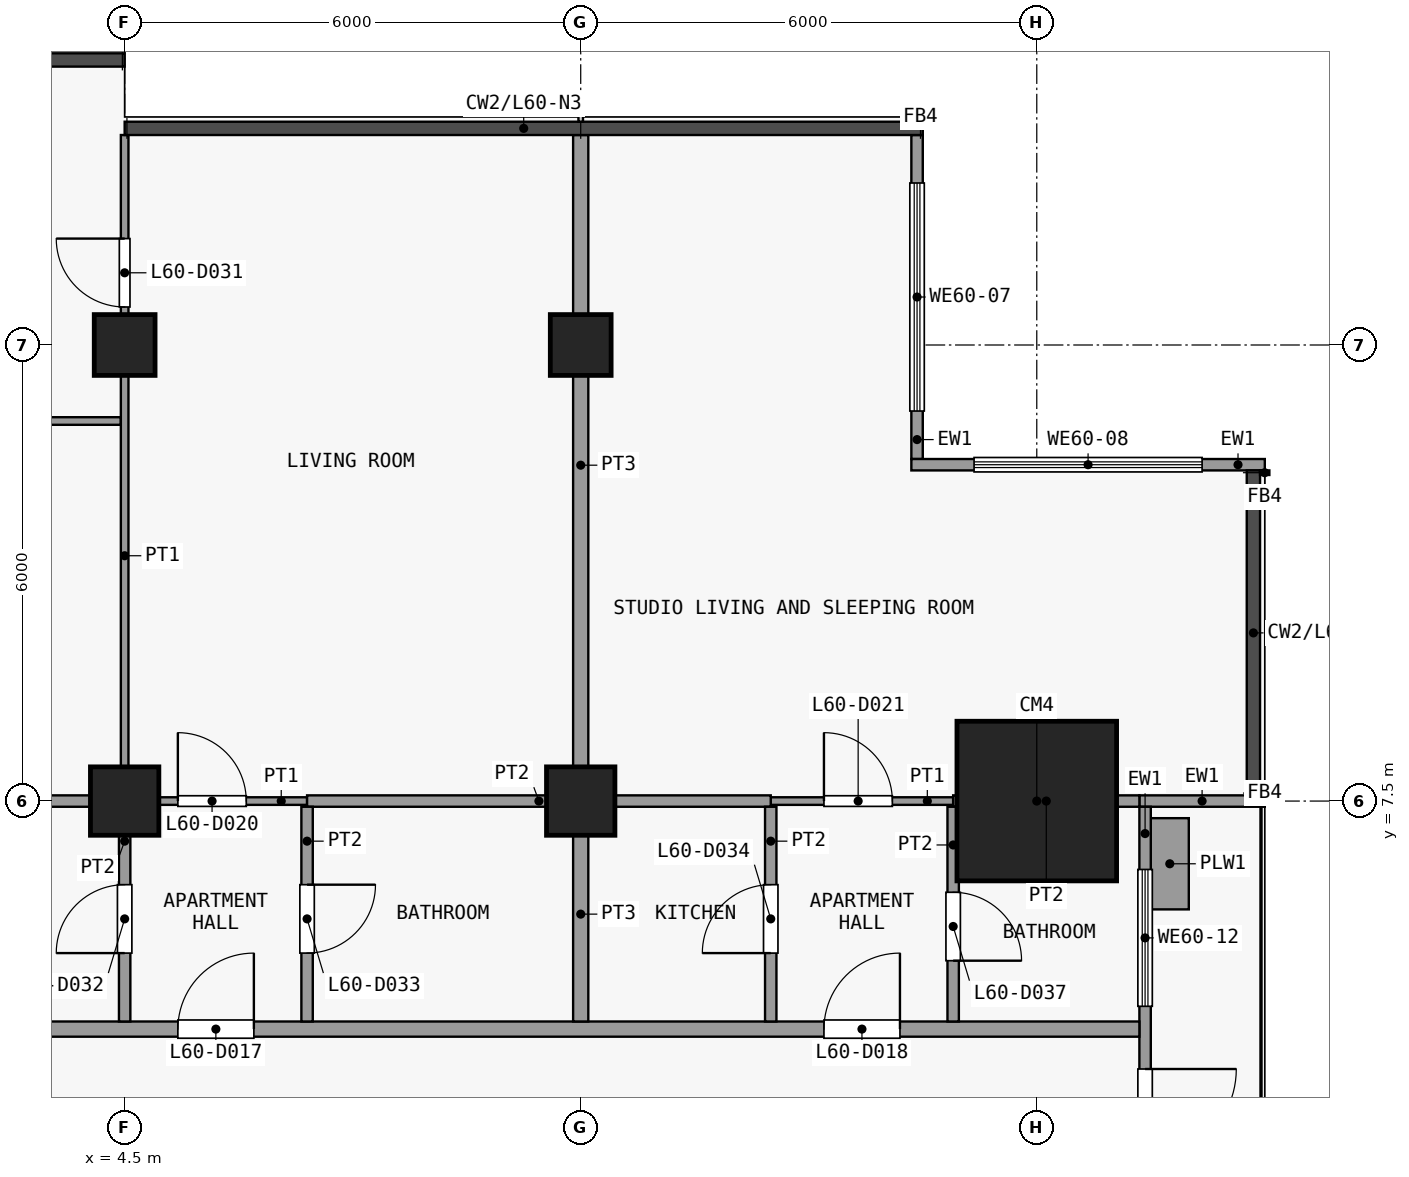
"""IFC4 building model, lengths in metres.
Left out: names, types, materials, properties, quantities, classifications, styles, units other than length and angle.
Written with IfcOpenShell. Run it as: python <this file> out.ifc"""

import sys

from ifc_helpers import new_model, si_unit, direction, frame, frame_2d, origin, origin_2d, place, context, subcontext, project, spatial, rectangle, extrude, element, fill, save


model = new_model("IFC4")
c1 = context("Model", 3, precision=1e-05, world=origin(), true_north=direction((0.0, 1.0)))
c2 = subcontext(c1, "Body", "Model", "MODEL_VIEW")
j1 = project(units=[si_unit("LENGTHUNIT", "METRE"), si_unit("PLANEANGLEUNIT", "RADIAN")], contexts=[c1])
p1 = place(None, origin())
s1 = spatial("IfcSite", under=j1, at=p1, CompositionType="ELEMENT")
p2 = place(p1, origin())
s2 = spatial("IfcBuilding", under=s1, at=p2, CompositionType="ELEMENT")
p3 = place(p2, frame((0.0, 0.0, 237.5)))
s3 = spatial("IfcBuildingStorey", under=s2, at=p3, CompositionType="ELEMENT", Elevation=237.5)
p4 = place(p3, frame((4.5, 7.5, 0.0), z_axis=(0.0, 0.0, 1.0), x_axis=(1.0, 0.0, 0.0)))
e1 = element("IfcColumn", 1, at=p4, inside=s3, PredefinedType="COLUMN", context=c2, shape_type="SweptSolid", body=[
    extrude(rectangle(XDim=0.9, YDim=0.9, at=origin_2d()), origin(), (0.0, 0.0, 1.0), 3.6),
])
p5 = place(p3, frame((4.5, 13.5, 0.0), z_axis=(0.0, 0.0, 1.0), x_axis=(1.0, 0.0, 0.0)))
e2 = element("IfcColumn", 2, at=p5, inside=s3, PredefinedType="COLUMN", context=c2, shape_type="SweptSolid", body=[
    extrude(rectangle(XDim=0.8, YDim=0.8, at=origin_2d()), origin(), (0.0, 0.0, 1.0), 3.6),
])
p6 = place(p3, frame((10.5, 7.5, 0.0), z_axis=(0.0, 0.0, 1.0), x_axis=(1.0, 0.0, 0.0)))
e3 = element("IfcColumn", 3, at=p6, inside=s3, PredefinedType="COLUMN", context=c2, shape_type="SweptSolid", body=[
    extrude(rectangle(XDim=0.9, YDim=0.9, at=origin_2d()), origin(), (0.0, 0.0, 1.0), 3.6),
])
p7 = place(p3, frame((10.5, 13.5, 0.0), z_axis=(0.0, 0.0, 1.0), x_axis=(1.0, 0.0, 0.0)))
e4 = element("IfcColumn", 4, at=p7, inside=s3, PredefinedType="COLUMN", context=c2, shape_type="SweptSolid", body=[
    extrude(rectangle(XDim=0.8, YDim=0.8, at=origin_2d()), origin(), (0.0, 0.0, 1.0), 3.6),
])
p8 = place(p3, frame((16.5, 7.5, 0.0), z_axis=(0.0, 0.0, 1.0), x_axis=(1.0, 0.0, 0.0)))
e5 = element("IfcColumn", 5, at=p8, inside=s3, PredefinedType="COLUMN", context=c2, shape_type="SweptSolid", body=[
    extrude(rectangle(XDim=2.1, YDim=2.1, at=origin_2d()), origin(), (0.0, 0.0, 1.0), 3.6),
])
p9 = place(p3, frame((14.925, 16.262, 0.0), z_axis=(0.0, 0.0, 1.0), x_axis=(0.0, -1.0, 0.0)))
e6 = element("IfcWall", 6, at=p9, inside=s3, PredefinedType="SOLIDWALL", context=c2, shape_type="SweptSolid", body=[
    extrude(rectangle(XDim=4.262, YDim=0.15, at=frame_2d((2.131, 0.0))), origin(), (0.0, 0.0, 1.0), 3.3),
])
p10 = place(p9, frame((0.631, 0.0, 0.9)))
e7 = element("IfcOpeningElement", 7, at=p10, cuts=e6, PredefinedType="OPENING", context=c2, shape_type="SweptSolid", body=[
    extrude(rectangle(XDim=3.0, YDim=2.4, at=frame_2d((1.5, 1.2))), frame((0.0, 0.085, 0.0), z_axis=(0.0, -1.0, 0.0), x_axis=(1.0, 0.0, 0.0)), (0.0, 0.0, 1.0), 0.17),
])
p11 = place(p3, frame((14.85, 11.925, 0.0), z_axis=(0.0, 0.0, 1.0), x_axis=(1.0, 0.0, 0.0)))
e8 = element("IfcWall", 8, at=p11, inside=s3, PredefinedType="SOLIDWALL", context=c2, shape_type="SweptSolid", body=[
    extrude(rectangle(XDim=4.65, YDim=0.15, at=frame_2d((2.325, 0.0))), origin(), (0.0, 0.0, 1.0), 3.3),
])
p12 = place(p11, frame((0.825, 0.0, 0.9)))
e9 = element("IfcOpeningElement", 9, at=p12, cuts=e8, PredefinedType="OPENING", context=c2, shape_type="SweptSolid", body=[
    extrude(rectangle(XDim=3.0, YDim=2.4, at=frame_2d((1.5, 1.2))), frame((0.0, 0.085, 0.0), z_axis=(0.0, -1.0, 0.0), x_axis=(1.0, 0.0, 0.0)), (0.0, 0.0, 1.0), 0.17),
])
p13 = place(p3, frame((17.85, 7.5, 0.0), z_axis=(0.0, 0.0, 1.0), x_axis=(1.0, 0.0, 0.0)))
e10 = element("IfcWall", 10, at=p13, inside=s3, PredefinedType="SOLIDWALL", context=c2, shape_type="SweptSolid", body=[
    extrude(rectangle(XDim=1.65, YDim=0.15, at=frame_2d((0.825, 0.0))), origin(), (0.0, 0.0, 1.0), 3.3),
])
p14 = place(p3, frame((17.925, 7.425, 0.0), z_axis=(0.0, 0.0, 1.0), x_axis=(0.0, -1.0, 0.0)))
e11 = element("IfcWall", 11, at=p14, inside=s3, PredefinedType="SOLIDWALL", context=c2, shape_type="SweptSolid", body=[
    extrude(rectangle(XDim=5.85, YDim=0.15, at=frame_2d((2.925, 0.0))), origin(), (0.0, 0.0, 1.0), 3.3),
])
p15 = place(p14, frame((3.45, 0.0, 0.0)))
e12 = element("IfcOpeningElement", 12, at=p15, cuts=e11, PredefinedType="OPENING", context=c2, shape_type="SweptSolid", body=[
    extrude(rectangle(XDim=1.2, YDim=2.4, at=frame_2d((0.6, 1.2))), frame((0.0, 0.085, 0.0), z_axis=(0.0, -1.0, 0.0), x_axis=(1.0, 0.0, 0.0)), (0.0, 0.0, 1.0), 0.17),
])
p16 = place(p14, frame((4.9, 0.0, 0.9)))
e13 = element("IfcOpeningElement", 13, at=p16, cuts=e11, PredefinedType="OPENING", context=c2, shape_type="SweptSolid", body=[
    extrude(rectangle(XDim=0.7, YDim=2.1, at=frame_2d((0.35, 1.05))), frame((0.0, 0.085, 0.0), z_axis=(0.0, -1.0, 0.0), x_axis=(1.0, 0.0, 0.0)), (0.0, 0.0, 1.0), 0.17),
])
p17 = place(p14, frame((0.825, 0.0, 0.9)))
e14 = element("IfcOpeningElement", 14, at=p17, cuts=e11, PredefinedType="OPENING", context=c2, shape_type="SweptSolid", body=[
    extrude(rectangle(XDim=1.8, YDim=2.1, at=frame_2d((0.9, 1.05))), frame((0.0, 0.085, 0.0), z_axis=(0.0, -1.0, 0.0), x_axis=(1.0, 0.0, 0.0)), (0.0, 0.0, 1.0), 0.17),
])
p18 = place(p3, frame((18.25, 6.075, 0.0), z_axis=(0.0, 0.0, 1.0), x_axis=(0.0, 1.0, 0.0)))
e15 = element("IfcWall", 15, at=p18, inside=s3, PredefinedType="USERDEFINED", context=c2, shape_type="SweptSolid", body=[
    extrude(rectangle(XDim=1.2, YDim=0.5, at=frame_2d((0.6, 0.0))), origin(), (0.0, 0.0, 1.0), 0.9),
])
p19 = place(p3, frame((-19.35, 4.5, 0.0), z_axis=(0.0, 0.0, 1.0), x_axis=(1.0, 0.0, 0.0)))
e16 = element("IfcWall", 16, at=p19, inside=s3, PredefinedType="PARTITIONING", context=c2, shape_type="SweptSolid", body=[
    extrude(rectangle(XDim=37.2, YDim=0.2, at=frame_2d((18.6, 0.0))), origin(), (0.0, 0.0, 1.0), 3.3),
])
p20 = place(p19, frame((7.05, 0.0, 0.0)))
e17 = element("IfcOpeningElement", 17, at=p20, cuts=e16, PredefinedType="OPENING", context=c2, shape_type="SweptSolid", body=[
    extrude(rectangle(XDim=1.0, YDim=2.1, at=frame_2d((0.5, 1.05))), frame((0.0, 0.11, 0.0), z_axis=(0.0, -1.0, 0.0), x_axis=(1.0, 0.0, 0.0)), (0.0, 0.0, 1.0), 0.22),
])
p21 = place(p19, frame((24.55, 0.0, 0.0)))
e18 = element("IfcOpeningElement", 18, at=p21, cuts=e16, PredefinedType="OPENING", context=c2, shape_type="SweptSolid", body=[
    extrude(rectangle(XDim=1.0, YDim=2.1, at=frame_2d((0.5, 1.05))), frame((0.0, 0.11, 0.0), z_axis=(0.0, -1.0, 0.0), x_axis=(1.0, 0.0, 0.0)), (0.0, 0.0, 1.0), 0.22),
])
p22 = place(p19, frame((33.05, 0.0, 0.0)))
e19 = element("IfcOpeningElement", 19, at=p22, cuts=e16, PredefinedType="OPENING", context=c2, shape_type="SweptSolid", body=[
    extrude(rectangle(XDim=1.0, YDim=2.1, at=frame_2d((0.5, 1.05))), frame((0.0, 0.11, 0.0), z_axis=(0.0, -1.0, 0.0), x_axis=(1.0, 0.0, 0.0)), (0.0, 0.0, 1.0), 0.22),
])
p23 = place(p3, frame((4.5, 7.5, 0.0), z_axis=(0.0, 0.0, 1.0), x_axis=(1.0, 0.0, 0.0)))
e20 = element("IfcWall", 20, at=p23, inside=s3, PredefinedType="PARTITIONING", context=c2, shape_type="SweptSolid", body=[
    extrude(rectangle(XDim=2.4, YDim=0.1, at=frame_2d((1.2, 0.0))), origin(), (0.0, 0.0, 1.0), 3.3),
])
p24 = place(p23, frame((0.7, 0.0, 0.0)))
e21 = element("IfcOpeningElement", 21, at=p24, cuts=e20, PredefinedType="OPENING", context=c2, shape_type="SweptSolid", body=[
    extrude(rectangle(XDim=0.9, YDim=2.1, at=frame_2d((0.45, 1.05))), frame((0.0, 0.06, 0.0), z_axis=(0.0, -1.0, 0.0), x_axis=(1.0, 0.0, 0.0)), (0.0, 0.0, 1.0), 0.12),
])
p25 = place(p3, frame((13.0, 7.5, 0.0), z_axis=(0.0, 0.0, 1.0), x_axis=(1.0, 0.0, 0.0)))
e22 = element("IfcWall", 22, at=p25, inside=s3, PredefinedType="PARTITIONING", context=c2, shape_type="SweptSolid", body=[
    extrude(rectangle(XDim=2.4, YDim=0.1, at=frame_2d((1.2, 0.0))), origin(), (0.0, 0.0, 1.0), 3.3),
])
p26 = place(p25, frame((0.7, 0.0, 0.0)))
e23 = element("IfcOpeningElement", 23, at=p26, cuts=e22, PredefinedType="OPENING", context=c2, shape_type="SweptSolid", body=[
    extrude(rectangle(XDim=0.9, YDim=2.1, at=frame_2d((0.45, 1.05))), frame((0.0, 0.06, 0.0), z_axis=(0.0, -1.0, 0.0), x_axis=(1.0, 0.0, 0.0)), (0.0, 0.0, 1.0), 0.12),
])
p27 = place(p3, frame((-4.5, 7.5, 0.0), z_axis=(0.0, 0.0, 1.0), x_axis=(1.0, 0.0, 0.0)))
e24 = element("IfcWall", 24, at=p27, inside=s3, PredefinedType="PARTITIONING", context=c2, shape_type="SweptSolid", body=[
    extrude(rectangle(XDim=9.0, YDim=0.15, at=frame_2d((4.5, 0.0))), origin(), (0.0, 0.0, 1.0), 3.3),
])
p28 = place(p3, frame((6.9, 7.5, 0.0), z_axis=(0.0, 0.0, 1.0), x_axis=(1.0, 0.0, 0.0)))
e25 = element("IfcWall", 25, at=p28, inside=s3, PredefinedType="PARTITIONING", context=c2, shape_type="SweptSolid", body=[
    extrude(rectangle(XDim=6.1, YDim=0.15, at=frame_2d((3.05, 0.0))), origin(), (0.0, 0.0, 1.0), 3.3),
])
p29 = place(p3, frame((15.4, 7.5, 0.0), z_axis=(0.0, 0.0, 1.0), x_axis=(1.0, 0.0, 0.0)))
e26 = element("IfcWall", 26, at=p29, inside=s3, PredefinedType="PARTITIONING", context=c2, shape_type="SweptSolid", body=[
    extrude(rectangle(XDim=2.45, YDim=0.15, at=frame_2d((1.225, 0.0))), origin(), (0.0, 0.0, 1.0), 3.3),
])
p30 = place(p3, frame((-1.2, 12.5, 0.0), z_axis=(0.0, 0.0, 1.0), x_axis=(1.0, 0.0, 0.0)))
e27 = element("IfcWall", 27, at=p30, inside=s3, PredefinedType="PARTITIONING", context=c2, shape_type="SweptSolid", body=[
    extrude(rectangle(XDim=5.65, YDim=0.1, at=frame_2d((2.825, 0.0))), origin(), (0.0, 0.0, 1.0), 3.3),
])
p31 = place(p30, frame((2.4, 0.0, 0.0)))
e28 = element("IfcOpeningElement", 28, at=p31, cuts=e27, PredefinedType="OPENING", context=c2, shape_type="SweptSolid", body=[
    extrude(rectangle(XDim=0.9, YDim=2.1, at=frame_2d((0.45, 1.05))), frame((0.0, 0.06, 0.0), z_axis=(0.0, -1.0, 0.0), x_axis=(1.0, 0.0, 0.0)), (0.0, 0.0, 1.0), 0.12),
])
p32 = place(p3, frame((4.5, 7.575, 0.0), z_axis=(0.0, 0.0, 1.0), x_axis=(0.0, 1.0, 0.0)))
e29 = element("IfcWall", 29, at=p32, inside=s3, PredefinedType="PARTITIONING", context=c2, shape_type="SweptSolid", body=[
    extrude(rectangle(XDim=8.688, YDim=0.1, at=frame_2d((4.344, 0.0))), origin(), (0.0, 0.0, 1.0), 3.3),
])
p33 = place(p32, frame((6.425, 0.0, 0.0)))
e30 = element("IfcOpeningElement", 30, at=p33, cuts=e29, PredefinedType="OPENING", context=c2, shape_type="SweptSolid", body=[
    extrude(rectangle(XDim=0.9, YDim=2.1, at=frame_2d((0.45, 1.05))), frame((0.0, 0.06, 0.0), z_axis=(0.0, -1.0, 0.0), x_axis=(1.0, 0.0, 0.0)), (0.0, 0.0, 1.0), 0.12),
])
p34 = place(p3, frame((4.5, 4.6, 0.0), z_axis=(0.0, 0.0, 1.0), x_axis=(0.0, 1.0, 0.0)))
e31 = element("IfcWall", 31, at=p34, inside=s3, PredefinedType="PARTITIONING", context=c2, shape_type="SweptSolid", body=[
    extrude(rectangle(XDim=2.825, YDim=0.15, at=frame_2d((1.413, 0.0))), origin(), (0.0, 0.0, 1.0), 3.3),
])
p35 = place(p34, frame((0.9, 0.0, 0.0)))
e32 = element("IfcOpeningElement", 32, at=p35, cuts=e31, PredefinedType="OPENING", context=c2, shape_type="SweptSolid", body=[
    extrude(rectangle(XDim=0.9, YDim=2.1, at=frame_2d((0.45, 1.05))), frame((0.0, 0.085, 0.0), z_axis=(0.0, -1.0, 0.0), x_axis=(1.0, 0.0, 0.0)), (0.0, 0.0, 1.0), 0.17),
])
p36 = place(p3, frame((6.9, 4.6, 0.0), z_axis=(0.0, 0.0, 1.0), x_axis=(0.0, 1.0, 0.0)))
e33 = element("IfcWall", 33, at=p36, inside=s3, PredefinedType="PARTITIONING", context=c2, shape_type="SweptSolid", body=[
    extrude(rectangle(XDim=2.825, YDim=0.15, at=frame_2d((1.413, 0.0))), origin(), (0.0, 0.0, 1.0), 3.3),
])
p37 = place(p36, frame((0.9, 0.0, 0.0)))
e34 = element("IfcOpeningElement", 34, at=p37, cuts=e33, PredefinedType="OPENING", context=c2, shape_type="SweptSolid", body=[
    extrude(rectangle(XDim=0.9, YDim=2.1, at=frame_2d((0.45, 1.05))), frame((0.0, 0.085, 0.0), z_axis=(0.0, -1.0, 0.0), x_axis=(1.0, 0.0, 0.0)), (0.0, 0.0, 1.0), 0.17),
])
p38 = place(p3, frame((10.5, 4.6, 0.0), z_axis=(0.0, 0.0, 1.0), x_axis=(0.0, 1.0, 0.0)))
e35 = element("IfcWall", 35, at=p38, inside=s3, PredefinedType="PARTITIONING", context=c2, shape_type="SweptSolid", body=[
    extrude(rectangle(XDim=2.825, YDim=0.2, at=frame_2d((1.413, 0.0))), origin(), (0.0, 0.0, 1.0), 3.3),
])
p39 = place(p3, frame((10.5, 7.575, 0.0), z_axis=(0.0, 0.0, 1.0), x_axis=(0.0, 1.0, 0.0)))
e36 = element("IfcWall", 36, at=p39, inside=s3, PredefinedType="PARTITIONING", context=c2, shape_type="SweptSolid", body=[
    extrude(rectangle(XDim=8.688, YDim=0.2, at=frame_2d((4.344, 0.0))), origin(), (0.0, 0.0, 1.0), 3.3),
])
p40 = place(p3, frame((13.0, 4.6, 0.0), z_axis=(0.0, 0.0, 1.0), x_axis=(0.0, 1.0, 0.0)))
e37 = element("IfcWall", 37, at=p40, inside=s3, PredefinedType="PARTITIONING", context=c2, shape_type="SweptSolid", body=[
    extrude(rectangle(XDim=2.825, YDim=0.15, at=frame_2d((1.413, 0.0))), origin(), (0.0, 0.0, 1.0), 3.3),
])
p41 = place(p40, frame((0.9, 0.0, 0.0)))
e38 = element("IfcOpeningElement", 38, at=p41, cuts=e37, PredefinedType="OPENING", context=c2, shape_type="SweptSolid", body=[
    extrude(rectangle(XDim=0.9, YDim=2.1, at=frame_2d((0.45, 1.05))), frame((0.0, 0.085, 0.0), z_axis=(0.0, -1.0, 0.0), x_axis=(1.0, 0.0, 0.0)), (0.0, 0.0, 1.0), 0.17),
])
p42 = place(p3, frame((15.4, 4.6, 0.0), z_axis=(0.0, 0.0, 1.0), x_axis=(0.0, 1.0, 0.0)))
e39 = element("IfcWall", 39, at=p42, inside=s3, PredefinedType="PARTITIONING", context=c2, shape_type="SweptSolid", body=[
    extrude(rectangle(XDim=2.825, YDim=0.15, at=frame_2d((1.413, 0.0))), origin(), (0.0, 0.0, 1.0), 3.3),
])
p43 = place(p42, frame((0.8, 0.0, 0.0)))
e40 = element("IfcOpeningElement", 40, at=p43, cuts=e39, PredefinedType="OPENING", context=c2, shape_type="SweptSolid", body=[
    extrude(rectangle(XDim=0.9, YDim=2.1, at=frame_2d((0.45, 1.05))), frame((0.0, 0.085, 0.0), z_axis=(0.0, -1.0, 0.0), x_axis=(1.0, 0.0, 0.0)), (0.0, 0.0, 1.0), 0.17),
])
p44 = place(p10, origin())
e41 = element("IfcWindow", 41, at=p44, inside=s3, PartitioningType="SINGLE_PANEL", PredefinedType="WINDOW", context=c2, shape_type="SweptSolid", body=[
    extrude(rectangle(XDim=3.0, YDim=2.4, at=frame_2d((1.5, 1.2))), frame((0.0, 0.03, 0.0), z_axis=(0.0, -1.0, 0.0), x_axis=(1.0, 0.0, 0.0)), (0.0, 0.0, 1.0), 0.06),
])
fill(e7, e41)
p45 = place(p12, origin())
e42 = element("IfcWindow", 42, at=p45, inside=s3, PartitioningType="SINGLE_PANEL", PredefinedType="WINDOW", context=c2, shape_type="SweptSolid", body=[
    extrude(rectangle(XDim=3.0, YDim=2.4, at=frame_2d((1.5, 1.2))), frame((0.0, 0.03, 0.0), z_axis=(0.0, -1.0, 0.0), x_axis=(1.0, 0.0, 0.0)), (0.0, 0.0, 1.0), 0.06),
])
fill(e9, e42)
p46 = place(p15, origin())
e43 = element("IfcDoor", 43, at=p46, inside=s3, OperationType="SINGLE_SWING_LEFT", PredefinedType="DOOR", context=c2, shape_type="SweptSolid", body=[
    extrude(rectangle(XDim=1.2, YDim=2.4, at=frame_2d((0.6, 1.2))), frame((0.0, 0.025, 0.0), z_axis=(0.0, -1.0, 0.0), x_axis=(1.0, 0.0, 0.0)), (0.0, 0.0, 1.0), 0.05),
])
fill(e12, e43)
p47 = place(p17, origin())
e44 = element("IfcWindow", 44, at=p47, inside=s3, PartitioningType="SINGLE_PANEL", PredefinedType="WINDOW", context=c2, shape_type="SweptSolid", body=[
    extrude(rectangle(XDim=1.8, YDim=2.1, at=frame_2d((0.9, 1.05))), frame((0.0, 0.03, 0.0), z_axis=(0.0, -1.0, 0.0), x_axis=(1.0, 0.0, 0.0)), (0.0, 0.0, 1.0), 0.06),
])
fill(e14, e44)
p48 = place(p21, origin())
e45 = element("IfcDoor", 45, at=p48, inside=s3, OperationType="SINGLE_SWING_LEFT", PredefinedType="DOOR", context=c2, shape_type="SweptSolid", body=[
    extrude(rectangle(XDim=1.0, YDim=2.1, at=frame_2d((0.5, 1.05))), frame((0.0, 0.025, 0.0), z_axis=(0.0, -1.0, 0.0), x_axis=(1.0, 0.0, 0.0)), (0.0, 0.0, 1.0), 0.05),
])
fill(e18, e45)
p49 = place(p22, origin())
e46 = element("IfcDoor", 46, at=p49, inside=s3, OperationType="SINGLE_SWING_LEFT", PredefinedType="DOOR", context=c2, shape_type="SweptSolid", body=[
    extrude(rectangle(XDim=1.0, YDim=2.1, at=frame_2d((0.5, 1.05))), frame((0.0, 0.025, 0.0), z_axis=(0.0, -1.0, 0.0), x_axis=(1.0, 0.0, 0.0)), (0.0, 0.0, 1.0), 0.05),
])
fill(e19, e46)
p50 = place(p24, origin())
e47 = element("IfcDoor", 47, at=p50, inside=s3, OperationType="SINGLE_SWING_RIGHT", PredefinedType="DOOR", context=c2, shape_type="SweptSolid", body=[
    extrude(rectangle(XDim=0.9, YDim=2.1, at=frame_2d((0.45, 1.05))), frame((0.0, 0.025, 0.0), z_axis=(0.0, -1.0, 0.0), x_axis=(1.0, 0.0, 0.0)), (0.0, 0.0, 1.0), 0.05),
])
fill(e21, e47)
p51 = place(p26, origin())
e48 = element("IfcDoor", 48, at=p51, inside=s3, OperationType="SINGLE_SWING_RIGHT", PredefinedType="DOOR", context=c2, shape_type="SweptSolid", body=[
    extrude(rectangle(XDim=0.9, YDim=2.1, at=frame_2d((0.45, 1.05))), frame((0.0, 0.025, 0.0), z_axis=(0.0, -1.0, 0.0), x_axis=(1.0, 0.0, 0.0)), (0.0, 0.0, 1.0), 0.05),
])
fill(e23, e48)
p52 = place(p33, origin())
e49 = element("IfcDoor", 49, at=p52, inside=s3, OperationType="SINGLE_SWING_LEFT", PredefinedType="DOOR", context=c2, shape_type="SweptSolid", body=[
    extrude(rectangle(XDim=0.9, YDim=2.1, at=frame_2d((0.45, 1.05))), frame((0.0, 0.025, 0.0), z_axis=(0.0, -1.0, 0.0), x_axis=(1.0, 0.0, 0.0)), (0.0, 0.0, 1.0), 0.05),
])
fill(e30, e49)
p53 = place(p35, origin())
e50 = element("IfcDoor", 50, at=p53, inside=s3, OperationType="SINGLE_SWING_RIGHT", PredefinedType="DOOR", context=c2, shape_type="SweptSolid", body=[
    extrude(rectangle(XDim=0.9, YDim=2.1, at=frame_2d((0.45, 1.05))), frame((0.0, 0.025, 0.0), z_axis=(0.0, -1.0, 0.0), x_axis=(1.0, 0.0, 0.0)), (0.0, 0.0, 1.0), 0.05),
])
fill(e32, e50)
p54 = place(p37, origin())
e51 = element("IfcDoor", 51, at=p54, inside=s3, OperationType="SINGLE_SWING_RIGHT", PredefinedType="DOOR", context=c2, shape_type="SweptSolid", body=[
    extrude(rectangle(XDim=0.9, YDim=2.1, at=frame_2d((0.45, 1.05))), frame((0.0, 0.025, 0.0), z_axis=(0.0, -1.0, 0.0), x_axis=(1.0, 0.0, 0.0)), (0.0, 0.0, 1.0), 0.05),
])
fill(e34, e51)
p55 = place(p41, origin())
e52 = element("IfcDoor", 52, at=p55, inside=s3, OperationType="SINGLE_SWING_RIGHT", PredefinedType="DOOR", context=c2, shape_type="SweptSolid", body=[
    extrude(rectangle(XDim=0.9, YDim=2.1, at=frame_2d((0.45, 1.05))), frame((0.0, 0.025, 0.0), z_axis=(0.0, -1.0, 0.0), x_axis=(1.0, 0.0, 0.0)), (0.0, 0.0, 1.0), 0.05),
])
fill(e38, e52)
p56 = place(p43, origin())
e53 = element("IfcDoor", 53, at=p56, inside=s3, OperationType="SINGLE_SWING_LEFT", PredefinedType="DOOR", context=c2, shape_type="SweptSolid", body=[
    extrude(rectangle(XDim=0.9, YDim=2.1, at=frame_2d((0.45, 1.05))), frame((0.0, 0.025, 0.0), z_axis=(0.0, -1.0, 0.0), x_axis=(1.0, 0.0, 0.0)), (0.0, 0.0, 1.0), 0.05),
])
fill(e40, e53)
save(model, sys.argv[1])
